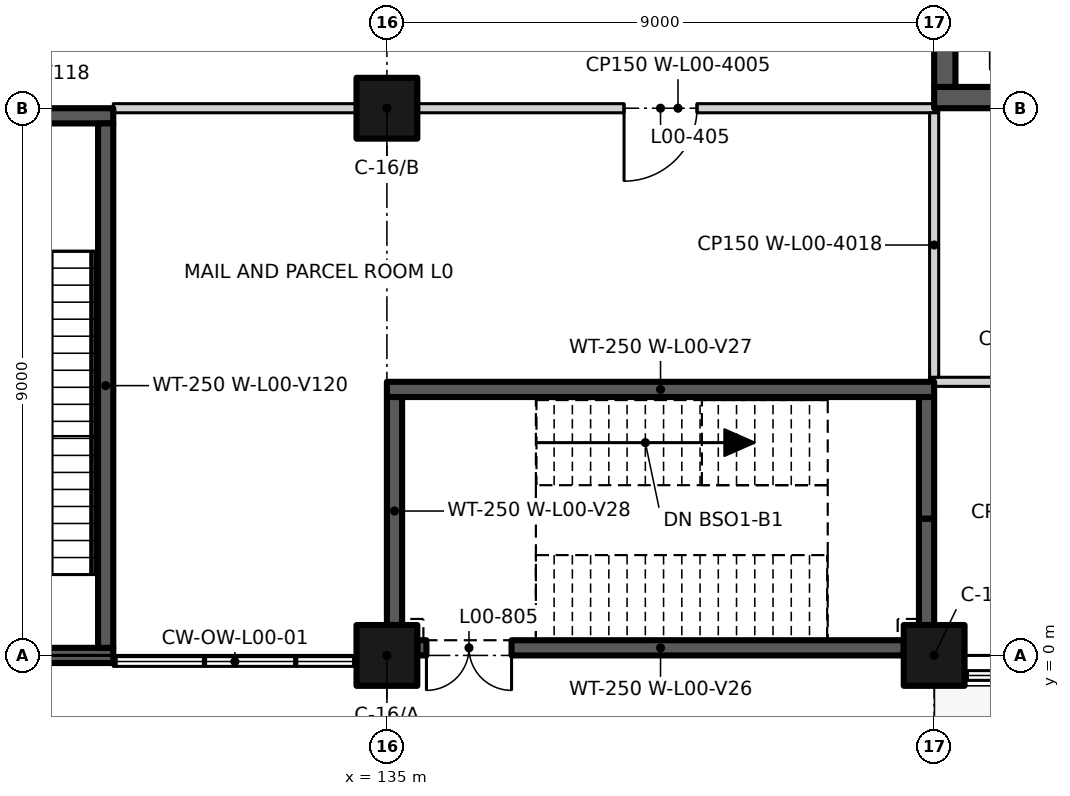
"""IFC4 building model, lengths in metres.
Left out: names, types, materials, properties, quantities, classifications, styles, units other than length and angle.
Written with IfcOpenShell. Run it as: python <this file> out.ifc"""

import sys

from ifc_helpers import new_model, si_unit, direction, frame, frame_2d, origin, origin_2d, place, context, subcontext, project, spatial, rectangle, extrude, element, fill, save


model = new_model("IFC4")
c1 = context("Model", 3, precision=1e-05, world=origin(), true_north=direction((0.0, 1.0)))
c2 = subcontext(c1, "Body", "Model", "MODEL_VIEW")
j1 = project(units=[si_unit("LENGTHUNIT", "METRE"), si_unit("PLANEANGLEUNIT", "RADIAN")], contexts=[c1])
p1 = place(None, origin())
s1 = spatial("IfcSite", under=j1, at=p1, CompositionType="ELEMENT")
p2 = place(p1, origin())
s2 = spatial("IfcBuilding", under=s1, at=p2, CompositionType="ELEMENT")
p3 = place(p2, origin())
s3 = spatial("IfcBuildingStorey", under=s2, at=p3, CompositionType="ELEMENT", Elevation=0.0)
for number, where, z_axis, x_axis in (
    (1, (135.0, 0.0, 0.0), (0.0, 0.0, 1.0), (1.0, 0.0, 0.0)),
    (2, (144.0, 0.0, 0.0), (0.0, 0.0, 1.0), (1.0, 0.0, 0.0)),
    (3, (135.0, 9.0, 0.0), (0.0, 0.0, 1.0), (1.0, 0.0, 0.0)),
):
    element("IfcColumn", number, at=place(p3, frame(where, z_axis=z_axis, x_axis=x_axis)), inside=s3, PredefinedType="COLUMN", context=c2, shape_type="SweptSolid", body=[
        extrude(rectangle(XDim=1.0, YDim=1.0, at=origin_2d()), origin(), (0.0, 0.0, 1.0), 6.0),
    ])
p4 = place(p3, frame((135.5, 0.125, 0.0), z_axis=(0.0, 0.0, 1.0), x_axis=(1.0, 0.0, 0.0)))
e4 = element("IfcWall", 4, at=p4, inside=s3, PredefinedType="SHEAR", context=c2, shape_type="SweptSolid", body=[
    extrude(rectangle(XDim=8.0, YDim=0.25, at=frame_2d((4.0, 0.0))), origin(), (0.0, 0.0, 1.0), 5.1),
])
p5 = place(p4, frame((1.55, 0.0, 0.0), z_axis=(0.0, 0.0, 1.0), x_axis=(-1.0, 0.0, 0.0)))
e5 = element("IfcOpeningElement", 5, at=p5, cuts=e4, PredefinedType="OPENING", context=c2, shape_type="SweptSolid", body=[
    extrude(rectangle(XDim=1.4, YDim=2.1, at=frame_2d((0.7, 1.05))), frame((0.0, 0.135, 0.0), z_axis=(0.0, -1.0, 0.0), x_axis=(1.0, 0.0, 0.0)), (0.0, 0.0, 1.0), 0.27),
])
p6 = place(p3, frame((135.0, 4.375, 0.0), z_axis=(0.0, 0.0, 1.0), x_axis=(1.0, 0.0, 0.0)))
e6 = element("IfcWall", 6, at=p6, inside=s3, PredefinedType="SHEAR", context=c2, shape_type="SweptSolid", body=[
    extrude(rectangle(XDim=9.0, YDim=0.25, at=frame_2d((4.5, 0.0))), origin(), (0.0, 0.0, 1.0), 5.7),
])
p7 = place(p3, frame((135.125, 0.5, 0.0), z_axis=(0.0, 0.0, 1.0), x_axis=(0.0, 1.0, 0.0)))
e7 = element("IfcWall", 7, at=p7, inside=s3, PredefinedType="SHEAR", context=c2, shape_type="SweptSolid", body=[
    extrude(rectangle(XDim=3.75, YDim=0.25, at=frame_2d((1.875, 0.0))), origin(), (0.0, 0.0, 1.0), 5.7),
])
p8 = place(p3, frame((143.875, 0.5, 0.0), z_axis=(0.0, 0.0, 1.0), x_axis=(0.0, 1.0, 0.0)))
e8 = element("IfcWall", 8, at=p8, inside=s3, PredefinedType="SHEAR", context=c2, shape_type="SweptSolid", body=[
    extrude(rectangle(XDim=1.75, YDim=0.25, at=frame_2d((0.875, 0.0))), origin(), (0.0, 0.0, 1.0), 5.7),
])
p9 = place(p3, frame((143.875, 2.25, 0.0), z_axis=(0.0, 0.0, 1.0), x_axis=(0.0, 1.0, 0.0)))
e9 = element("IfcWall", 9, at=p9, inside=s3, PredefinedType="SHEAR", context=c2, shape_type="SweptSolid", body=[
    extrude(rectangle(XDim=2.0, YDim=0.25, at=frame_2d((1.0, 0.0))), origin(), (0.0, 0.0, 1.0), 5.7),
])
p10 = place(p3, frame((128.188, 0.0, 0.0), z_axis=(0.0, 0.0, 1.0), x_axis=(1.0, 0.0, 0.0)))
e10 = element("IfcWall", 10, at=p10, inside=s3, PredefinedType="SHEAR", context=c2, shape_type="SweptSolid", body=[
    extrude(rectangle(XDim=2.312, YDim=0.25, at=frame_2d((1.156, 0.0))), origin(), (0.0, 0.0, 1.0), 6.0),
])
p11 = place(p3, frame((126.5, 8.875, 0.0), z_axis=(0.0, 0.0, 1.0), x_axis=(1.0, 0.0, 0.0)))
e11 = element("IfcWall", 11, at=p11, inside=s3, PredefinedType="SHEAR", context=c2, shape_type="SweptSolid", body=[
    extrude(rectangle(XDim=4.0, YDim=0.25, at=frame_2d((2.0, 0.0))), origin(), (0.0, 0.0, 1.0), 6.0),
])
p12 = place(p11, frame((2.3, 0.0, 0.0), z_axis=(0.0, 0.0, 1.0), x_axis=(-1.0, 0.0, 0.0)))
e12 = element("IfcOpeningElement", 12, at=p12, cuts=e11, PredefinedType="OPENING", context=c2, shape_type="SweptSolid", body=[
    extrude(rectangle(XDim=1.1, YDim=2.1, at=frame_2d((0.55, 1.05))), frame((0.0, 0.135, 0.0), z_axis=(0.0, -1.0, 0.0), x_axis=(1.0, 0.0, 0.0)), (0.0, 0.0, 1.0), 0.27),
])
p13 = place(p3, frame((130.375, 0.125, 0.0), z_axis=(0.0, 0.0, 1.0), x_axis=(0.0, 1.0, 0.0)))
e13 = element("IfcWall", 13, at=p13, inside=s3, PredefinedType="SHEAR", context=c2, shape_type="SweptSolid", body=[
    extrude(rectangle(XDim=8.625, YDim=0.25, at=frame_2d((4.312, 0.0))), origin(), (0.0, 0.0, 1.0), 6.0),
])
p14 = place(p3, frame((143.925, 4.5, 0.0), z_axis=(0.0, 0.0, 1.0), x_axis=(1.0, 0.0, 0.0)))
e14 = element("IfcWall", 14, at=p14, inside=s3, PredefinedType="PARTITIONING", context=c2, shape_type="SweptSolid", body=[
    extrude(rectangle(XDim=4.65, YDim=0.15, at=frame_2d((2.325, 0.0))), origin(), (0.0, 0.0, 1.0), 5.7),
])
p15 = place(p14, frame((2.775, 0.0, 0.0), z_axis=(0.0, 0.0, 1.0), x_axis=(-1.0, 0.0, 0.0)))
e15 = element("IfcOpeningElement", 15, at=p15, cuts=e14, PredefinedType="OPENING", context=c2, shape_type="SweptSolid", body=[
    extrude(rectangle(XDim=0.9, YDim=2.1, at=frame_2d((0.45, 1.05))), frame((0.0, 0.085, 0.0), z_axis=(0.0, -1.0, 0.0), x_axis=(1.0, 0.0, 0.0)), (0.0, 0.0, 1.0), 0.17),
])
p16 = place(p3, frame((130.5, 9.0, 0.0), z_axis=(0.0, 0.0, 1.0), x_axis=(1.0, 0.0, 0.0)))
e16 = element("IfcWall", 16, at=p16, inside=s3, PredefinedType="PARTITIONING", context=c2, shape_type="SweptSolid", body=[
    extrude(rectangle(XDim=4.0, YDim=0.15, at=frame_2d((2.0, 0.0))), origin(), (0.0, 0.0, 1.0), 5.7),
])
p17 = place(p3, frame((135.5, 9.0, 0.0), z_axis=(0.0, 0.0, 1.0), x_axis=(1.0, 0.0, 0.0)))
e17 = element("IfcWall", 17, at=p17, inside=s3, PredefinedType="PARTITIONING", context=c2, shape_type="SweptSolid", body=[
    extrude(rectangle(XDim=8.575, YDim=0.15, at=frame_2d((4.288, 0.0))), origin(), (0.0, 0.0, 1.0), 5.7),
])
p18 = place(p17, frame((4.6, 0.0, 0.0), z_axis=(0.0, 0.0, 1.0), x_axis=(-1.0, 0.0, 0.0)))
e18 = element("IfcOpeningElement", 18, at=p18, cuts=e17, PredefinedType="OPENING", context=c2, shape_type="SweptSolid", body=[
    extrude(rectangle(XDim=1.2, YDim=2.1, at=frame_2d((0.6, 1.05))), frame((0.0, 0.085, 0.0), z_axis=(0.0, -1.0, 0.0), x_axis=(1.0, 0.0, 0.0)), (0.0, 0.0, 1.0), 0.17),
])
p19 = place(p3, frame((144.0, 9.175, 0.0), z_axis=(0.0, 0.0, 1.0), x_axis=(1.0, 0.0, 0.0)))
e19 = element("IfcWall", 19, at=p19, inside=s3, PredefinedType="SHEAR", context=c2, shape_type="SweptSolid", body=[
    extrude(rectangle(XDim=18.0, YDim=0.35, at=frame_2d((9.0, 0.0))), origin(), (0.0, 0.0, 1.0), 5.7),
])
p20 = place(p19, frame((16.463, 0.0, 0.0), z_axis=(0.0, 0.0, 1.0), x_axis=(-1.0, 0.0, 0.0)))
e20 = element("IfcOpeningElement", 20, at=p20, cuts=e19, PredefinedType="OPENING", context=c2, shape_type="SweptSolid", body=[
    extrude(rectangle(XDim=2.1, YDim=2.4, at=frame_2d((1.05, 1.2))), frame((0.0, 0.185, 0.0), z_axis=(0.0, -1.0, 0.0), x_axis=(1.0, 0.0, 0.0)), (0.0, 0.0, 1.0), 0.37),
])
p21 = place(p3, frame((144.0, 4.575, 0.0), z_axis=(0.0, 0.0, 1.0), x_axis=(0.0, 1.0, 0.0)))
e21 = element("IfcWall", 21, at=p21, inside=s3, PredefinedType="PARTITIONING", context=c2, shape_type="SweptSolid", body=[
    extrude(rectangle(XDim=4.35, YDim=0.15, at=frame_2d((2.175, 0.0))), origin(), (0.0, 0.0, 1.0), 5.7),
])
p22 = place(p3, frame((144.175, 9.35, 0.0), z_axis=(0.0, 0.0, 1.0), x_axis=(0.0, 1.0, 0.0)))
e22 = element("IfcWall", 22, at=p22, inside=s3, PredefinedType="SHEAR", context=c2, shape_type="SweptSolid", body=[
    extrude(rectangle(XDim=17.4, YDim=0.35, at=frame_2d((8.7, 0.0))), origin(), (0.0, 0.0, 1.0), 5.7),
])
p23 = place(p22, frame((3.75, 0.0, 0.0)))
e23 = element("IfcOpeningElement", 23, at=p23, cuts=e22, PredefinedType="OPENING", context=c2, shape_type="SweptSolid", body=[
    extrude(rectangle(XDim=1.6, YDim=2.4, at=frame_2d((0.8, 1.2))), frame((0.0, 0.185, 0.0), z_axis=(0.0, -1.0, 0.0), x_axis=(1.0, 0.0, 0.0)), (0.0, 0.0, 1.0), 0.37),
])
p24 = place(p5, origin())
e24 = element("IfcDoor", 24, at=p24, inside=s3, OperationType="DOUBLE_DOOR_SINGLE_SWING", PredefinedType="DOOR", context=c2, shape_type="SweptSolid", body=[
    extrude(rectangle(XDim=1.4, YDim=2.1, at=frame_2d((0.7, 1.05))), frame((0.0, 0.025, 0.0), z_axis=(0.0, -1.0, 0.0), x_axis=(1.0, 0.0, 0.0)), (0.0, 0.0, 1.0), 0.05),
])
fill(e5, e24)
p25 = place(p18, origin())
e25 = element("IfcDoor", 25, at=p25, inside=s3, OperationType="SINGLE_SWING_RIGHT", PredefinedType="DOOR", context=c2, shape_type="SweptSolid", body=[
    extrude(rectangle(XDim=1.2, YDim=2.1, at=frame_2d((0.6, 1.05))), frame((0.0, 0.025, 0.0), z_axis=(0.0, -1.0, 0.0), x_axis=(1.0, 0.0, 0.0)), (0.0, 0.0, 1.0), 0.05),
])
fill(e18, e25)
save(model, sys.argv[1])
